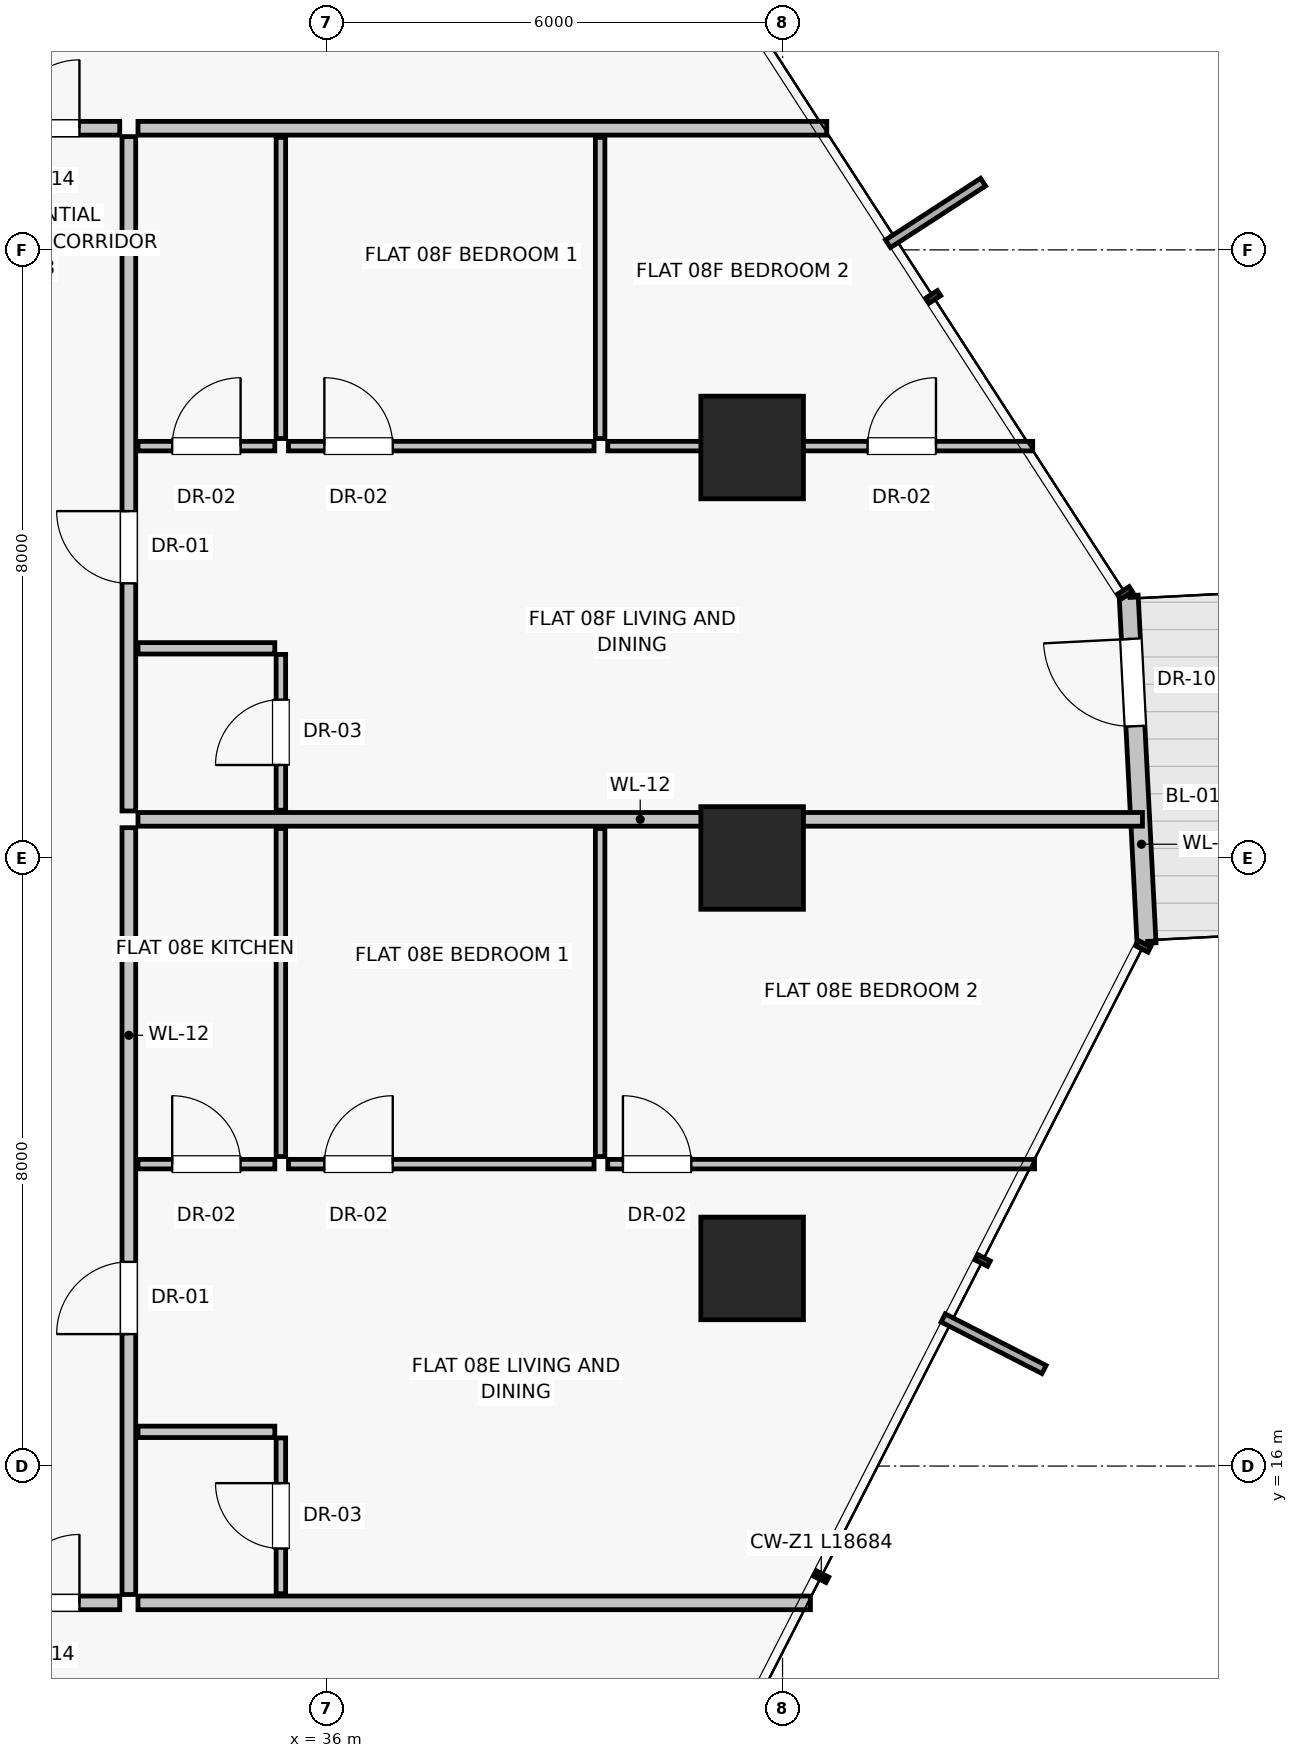
"""IFC4 building model, lengths in metres.
Left out: names, types, materials, properties, quantities, classifications, styles, units other than length and angle.
Written with IfcOpenShell. Run it as: python <this file> out.ifc"""

import sys

from ifc_helpers import new_model, si_unit, direction, frame, frame_2d, origin, origin_2d, place, context, subcontext, project, spatial, rectangle, extrude, source, transform, mapped, element, fill, save


model = new_model("IFC4")
c1 = context("Model", 3, precision=1e-05, world=origin(), true_north=direction((0.0, 1.0)))
c2 = subcontext(c1, "Body", "Model", "MODEL_VIEW")
j1 = project(units=[si_unit("LENGTHUNIT", "METRE"), si_unit("PLANEANGLEUNIT", "RADIAN")], contexts=[c1])
p1 = place(None, origin())
s1 = spatial("IfcSite", under=j1, at=p1, CompositionType="ELEMENT")
p2 = place(p1, origin())
s2 = spatial("IfcBuilding", under=s1, at=p2, CompositionType="ELEMENT")
p3 = place(p2, frame((0.0, 0.0, 33.8)))
s3 = spatial("IfcBuildingStorey", under=s2, at=p3, CompositionType="ELEMENT", Elevation=33.8)
for number, where, z_axis, x_axis in (
    (1, (41.6, 18.6, 0.0), (0.0, 0.0, 1.0), (1.0, 0.0, 0.0)),
    (2, (41.6, 24.0, 0.0), (0.0, 0.0, 1.0), (1.0, 0.0, 0.0)),
    (3, (41.6, 29.4, 0.0), (0.0, 0.0, 1.0), (1.0, 0.0, 0.0)),
):
    element("IfcColumn", number, at=place(p3, frame(where, z_axis=z_axis, x_axis=x_axis)), inside=s3, PredefinedType="COLUMN", context=c2, shape_type="SweptSolid", body=[
        extrude(rectangle(XDim=1.35, YDim=1.35, at=origin_2d()), origin(), (0.0, 0.0, 1.0), 3.25),
    ])
p4 = place(p3, frame((46.789, 22.877, 0.0), z_axis=(0.0, 0.0, 1.0), x_axis=(-0.051280186927, 0.998684305689, 0.0)))
e4 = element("IfcWall", 4, at=p4, inside=s3, PredefinedType="SOLIDWALL", context=c2, shape_type="SweptSolid", body=[
    extrude(rectangle(XDim=4.58, YDim=0.25, at=frame_2d((2.29, 0.0))), origin(), (0.0, 0.0, 1.0), 3.0),
])
p5 = place(p4, frame((2.86, 0.0, 0.0)))
e5 = element("IfcOpeningElement", 5, at=p5, cuts=e4, PredefinedType="OPENING", context=c2, shape_type="SweptSolid", body=[
    extrude(rectangle(XDim=1.15, YDim=2.25, at=frame_2d((0.575, 1.125))), frame((0.0, 0.135, 0.0), z_axis=(0.0, -1.0, 0.0), x_axis=(1.0, 0.0, 0.0)), (0.0, 0.0, 1.0), 0.27),
])
p6 = place(p3, frame((33.52, 14.2, 0.0), z_axis=(0.0, 0.0, 1.0), x_axis=(1.0, 0.0, 0.0)))
e6 = element("IfcWall", 6, at=p6, inside=s3, PredefinedType="PARTITIONING", context=c2, shape_type="SweptSolid", body=[
    extrude(rectangle(XDim=8.847, YDim=0.18, at=frame_2d((4.423, 0.0))), origin(), (0.0, 0.0, 1.0), 3.0),
])
p7 = place(p3, frame((33.52, 33.6, 0.0), z_axis=(0.0, 0.0, 1.0), x_axis=(1.0, 0.0, 0.0)))
e7 = element("IfcWall", 7, at=p7, inside=s3, PredefinedType="PARTITIONING", context=c2, shape_type="SweptSolid", body=[
    extrude(rectangle(XDim=9.062, YDim=0.18, at=frame_2d((4.531, 0.0))), origin(), (0.0, 0.0, 1.0), 3.0),
])
p8 = place(p3, frame((33.4, 14.31, 0.0), z_axis=(0.0, 0.0, 1.0), x_axis=(0.0, 1.0, 0.0)))
e8 = element("IfcWall", 8, at=p8, inside=s3, PredefinedType="PARTITIONING", context=c2, shape_type="SweptSolid", body=[
    extrude(rectangle(XDim=10.088, YDim=0.18, at=frame_2d((5.044, 0.0))), origin(), (0.0, 0.0, 1.0), 3.0),
])
p9 = place(p8, frame((3.426, 0.0, 0.0)))
e9 = element("IfcOpeningElement", 9, at=p9, cuts=e8, PredefinedType="OPENING", context=c2, shape_type="SweptSolid", body=[
    extrude(rectangle(XDim=0.95, YDim=2.02, at=frame_2d((0.475, 1.01))), frame((0.0, 0.1, 0.0), z_axis=(0.0, -1.0, 0.0), x_axis=(1.0, 0.0, 0.0)), (0.0, 0.0, 1.0), 0.2),
])
p10 = place(p3, frame((33.52, 16.45, 0.0), z_axis=(0.0, 0.0, 1.0), x_axis=(1.0, 0.0, 0.0)))
e10 = element("IfcWall", 10, at=p10, inside=s3, PredefinedType="PARTITIONING", context=c2, shape_type="SweptSolid", body=[
    extrude(rectangle(XDim=1.8, YDim=0.15, at=frame_2d((0.9, 0.0))), origin(), (0.0, 0.0, 1.0), 3.0),
])
p11 = place(p3, frame((35.4, 14.32, 0.0), z_axis=(0.0, 0.0, 1.0), x_axis=(0.0, 1.0, 0.0)))
e11 = element("IfcWall", 11, at=p11, inside=s3, PredefinedType="PARTITIONING", context=c2, shape_type="SweptSolid", body=[
    extrude(rectangle(XDim=2.05, YDim=0.125, at=frame_2d((1.025, 0.0))), origin(), (0.0, 0.0, 1.0), 3.0),
])
p12 = place(p11, frame((0.595, 0.0, 0.0)))
e12 = element("IfcOpeningElement", 12, at=p12, cuts=e11, PredefinedType="OPENING", context=c2, shape_type="SweptSolid", body=[
    extrude(rectangle(XDim=0.86, YDim=2.01, at=frame_2d((0.43, 1.005))), frame((0.0, 0.073, 0.0), z_axis=(0.0, -1.0, 0.0), x_axis=(1.0, 0.0, 0.0)), (0.0, 0.0, 1.0), 0.145),
])
p13 = place(p3, frame((33.52, 19.972, 0.0), z_axis=(0.0, 0.0, 1.0), x_axis=(1.0, 0.0, 0.0)))
e13 = element("IfcWall", 13, at=p13, inside=s3, PredefinedType="PARTITIONING", context=c2, shape_type="SweptSolid", body=[
    extrude(rectangle(XDim=1.8, YDim=0.125, at=frame_2d((0.9, 0.0))), origin(), (0.0, 0.0, 1.0), 3.0),
])
p14 = place(p13, frame((0.45, 0.0, 0.0)))
e14 = element("IfcOpeningElement", 14, at=p14, cuts=e13, PredefinedType="OPENING", context=c2, shape_type="SweptSolid", body=[
    extrude(rectangle(XDim=0.9, YDim=2.01, at=frame_2d((0.45, 1.005))), frame((0.0, 0.073, 0.0), z_axis=(0.0, -1.0, 0.0), x_axis=(1.0, 0.0, 0.0)), (0.0, 0.0, 1.0), 0.145),
])
for number, where, z_axis, x_axis in (
    (15, (35.4, 20.072, 0.0), (0.0, 0.0, 1.0), (0.0, 1.0, 0.0)),
    (16, (39.6, 20.072, 0.0), (0.0, 0.0, 1.0), (0.0, 1.0, 0.0)),
):
    element("IfcWall", number, at=place(p3, frame(where, z_axis=z_axis, x_axis=x_axis)), inside=s3, PredefinedType="PARTITIONING", context=c2, shape_type="SweptSolid", body=[
        extrude(rectangle(XDim=4.316, YDim=0.125, at=frame_2d((2.158, 0.0))), origin(), (0.0, 0.0, 1.0), 3.0),
    ])
p15 = place(p3, frame((35.5, 19.972, 0.0), z_axis=(0.0, 0.0, 1.0), x_axis=(1.0, 0.0, 0.0)))
e17 = element("IfcWall", 17, at=p15, inside=s3, PredefinedType="PARTITIONING", context=c2, shape_type="SweptSolid", body=[
    extrude(rectangle(XDim=4.02, YDim=0.125, at=frame_2d((2.01, 0.0))), origin(), (0.0, 0.0, 1.0), 3.0),
])
p16 = place(p15, frame((0.472, 0.0, 0.0)))
e18 = element("IfcOpeningElement", 18, at=p16, cuts=e17, PredefinedType="OPENING", context=c2, shape_type="SweptSolid", body=[
    extrude(rectangle(XDim=0.9, YDim=2.01, at=frame_2d((0.45, 1.005))), frame((0.0, 0.073, 0.0), z_axis=(0.0, -1.0, 0.0), x_axis=(1.0, 0.0, 0.0)), (0.0, 0.0, 1.0), 0.145),
])
p17 = place(p3, frame((39.7, 19.972, 0.0), z_axis=(0.0, 0.0, 1.0), x_axis=(1.0, 0.0, 0.0)))
e19 = element("IfcWall", 19, at=p17, inside=s3, PredefinedType="PARTITIONING", context=c2, shape_type="SweptSolid", body=[
    extrude(rectangle(XDim=5.616, YDim=0.125, at=frame_2d((2.808, 0.0))), origin(), (0.0, 0.0, 1.0), 3.0),
])
p18 = place(p17, frame((0.2, 0.0, 0.0)))
e20 = element("IfcOpeningElement", 20, at=p18, cuts=e19, PredefinedType="OPENING", context=c2, shape_type="SweptSolid", body=[
    extrude(rectangle(XDim=0.9, YDim=2.01, at=frame_2d((0.45, 1.005))), frame((0.0, 0.073, 0.0), z_axis=(0.0, -1.0, 0.0), x_axis=(1.0, 0.0, 0.0)), (0.0, 0.0, 1.0), 0.145),
])
p19 = place(p3, frame((33.52, 24.508, 0.0), z_axis=(0.0, 0.0, 1.0), x_axis=(1.0, 0.0, 0.0)))
e21 = element("IfcWall", 21, at=p19, inside=s3, PredefinedType="PARTITIONING", context=c2, shape_type="SweptSolid", body=[
    extrude(rectangle(XDim=13.215, YDim=0.18, at=frame_2d((6.607, 0.0))), origin(), (0.0, 0.0, 1.0), 3.0),
])
p20 = place(p3, frame((33.4, 24.618, 0.0), z_axis=(0.0, 0.0, 1.0), x_axis=(0.0, 1.0, 0.0)))
e22 = element("IfcWall", 22, at=p20, inside=s3, PredefinedType="PARTITIONING", context=c2, shape_type="SweptSolid", body=[
    extrude(rectangle(XDim=8.872, YDim=0.18, at=frame_2d((4.436, 0.0))), origin(), (0.0, 0.0, 1.0), 3.0),
])
p21 = place(p20, frame((2.995, 0.0, 0.0)))
e23 = element("IfcOpeningElement", 23, at=p21, cuts=e22, PredefinedType="OPENING", context=c2, shape_type="SweptSolid", body=[
    extrude(rectangle(XDim=0.95, YDim=2.02, at=frame_2d((0.475, 1.01))), frame((0.0, 0.1, 0.0), z_axis=(0.0, -1.0, 0.0), x_axis=(1.0, 0.0, 0.0)), (0.0, 0.0, 1.0), 0.2),
])
p22 = place(p3, frame((33.52, 26.758, 0.0), z_axis=(0.0, 0.0, 1.0), x_axis=(1.0, 0.0, 0.0)))
e24 = element("IfcWall", 24, at=p22, inside=s3, PredefinedType="PARTITIONING", context=c2, shape_type="SweptSolid", body=[
    extrude(rectangle(XDim=1.8, YDim=0.15, at=frame_2d((0.9, 0.0))), origin(), (0.0, 0.0, 1.0), 3.0),
])
p23 = place(p3, frame((35.4, 24.628, 0.0), z_axis=(0.0, 0.0, 1.0), x_axis=(0.0, 1.0, 0.0)))
e25 = element("IfcWall", 25, at=p23, inside=s3, PredefinedType="PARTITIONING", context=c2, shape_type="SweptSolid", body=[
    extrude(rectangle(XDim=2.05, YDim=0.125, at=frame_2d((1.025, 0.0))), origin(), (0.0, 0.0, 1.0), 3.0),
])
p24 = place(p23, frame((0.595, 0.0, 0.0)))
e26 = element("IfcOpeningElement", 26, at=p24, cuts=e25, PredefinedType="OPENING", context=c2, shape_type="SweptSolid", body=[
    extrude(rectangle(XDim=0.86, YDim=2.01, at=frame_2d((0.43, 1.005))), frame((0.0, 0.073, 0.0), z_axis=(0.0, -1.0, 0.0), x_axis=(1.0, 0.0, 0.0)), (0.0, 0.0, 1.0), 0.145),
])
p25 = place(p3, frame((33.52, 29.418, 0.0), z_axis=(0.0, 0.0, 1.0), x_axis=(1.0, 0.0, 0.0)))
e27 = element("IfcWall", 27, at=p25, inside=s3, PredefinedType="PARTITIONING", context=c2, shape_type="SweptSolid", body=[
    extrude(rectangle(XDim=1.8, YDim=0.125, at=frame_2d((0.9, 0.0))), origin(), (0.0, 0.0, 1.0), 3.0),
])
p26 = place(p25, frame((0.45, 0.0, 0.0)))
e28 = element("IfcOpeningElement", 28, at=p26, cuts=e27, PredefinedType="OPENING", context=c2, shape_type="SweptSolid", body=[
    extrude(rectangle(XDim=0.9, YDim=2.01, at=frame_2d((0.45, 1.005))), frame((0.0, 0.073, 0.0), z_axis=(0.0, -1.0, 0.0), x_axis=(1.0, 0.0, 0.0)), (0.0, 0.0, 1.0), 0.145),
])
for number, where, z_axis, x_axis in (
    (29, (35.4, 29.518, 0.0), (0.0, 0.0, 1.0), (0.0, 1.0, 0.0)),
    (30, (39.6, 29.518, 0.0), (0.0, 0.0, 1.0), (0.0, 1.0, 0.0)),
):
    element("IfcWall", number, at=place(p3, frame(where, z_axis=z_axis, x_axis=x_axis)), inside=s3, PredefinedType="PARTITIONING", context=c2, shape_type="SweptSolid", body=[
        extrude(rectangle(XDim=3.962, YDim=0.125, at=frame_2d((1.981, 0.0))), origin(), (0.0, 0.0, 1.0), 3.0),
    ])
p27 = place(p3, frame((35.5, 29.418, 0.0), z_axis=(0.0, 0.0, 1.0), x_axis=(1.0, 0.0, 0.0)))
e31 = element("IfcWall", 31, at=p27, inside=s3, PredefinedType="PARTITIONING", context=c2, shape_type="SweptSolid", body=[
    extrude(rectangle(XDim=4.02, YDim=0.125, at=frame_2d((2.01, 0.0))), origin(), (0.0, 0.0, 1.0), 2.299),
])
p28 = place(p27, frame((0.472, 0.0, 0.0)))
e32 = element("IfcOpeningElement", 32, at=p28, cuts=e31, PredefinedType="OPENING", context=c2, shape_type="SweptSolid", body=[
    extrude(rectangle(XDim=0.9, YDim=2.01, at=frame_2d((0.45, 1.005))), frame((0.0, 0.073, 0.0), z_axis=(0.0, -1.0, 0.0), x_axis=(1.0, 0.0, 0.0)), (0.0, 0.0, 1.0), 0.145),
])
p29 = place(p3, frame((39.7, 29.418, 0.0), z_axis=(0.0, 0.0, 1.0), x_axis=(1.0, 0.0, 0.0)))
e33 = element("IfcWall", 33, at=p29, inside=s3, PredefinedType="PARTITIONING", context=c2, shape_type="SweptSolid", body=[
    extrude(rectangle(XDim=5.591, YDim=0.125, at=frame_2d((2.796, 0.0))), origin(), (0.0, 0.0, 1.0), 2.299),
])
p30 = place(p29, frame((3.418, 0.0, 0.0)))
e34 = element("IfcOpeningElement", 34, at=p30, cuts=e33, PredefinedType="OPENING", context=c2, shape_type="SweptSolid", body=[
    extrude(rectangle(XDim=0.9, YDim=2.01, at=frame_2d((0.45, 1.005))), frame((0.0, 0.073, 0.0), z_axis=(0.0, -1.0, 0.0), x_axis=(1.0, 0.0, 0.0)), (0.0, 0.0, 1.0), 0.145),
])
p31 = place(p3, frame((31.32, 14.2, 0.0), z_axis=(0.0, 0.0, 1.0), x_axis=(1.0, 0.0, 0.0)))
e35 = element("IfcWall", 35, at=p31, inside=s3, PredefinedType="PARTITIONING", context=c2, shape_type="SweptSolid", body=[
    extrude(rectangle(XDim=1.96, YDim=0.18, at=frame_2d((0.98, 0.0))), origin(), (0.0, 0.0, 1.0), 3.0),
])
p32 = place(p31, frame((0.53, 0.0, 0.0)))
e36 = element("IfcOpeningElement", 36, at=p32, cuts=e35, PredefinedType="OPENING", context=c2, shape_type="SweptSolid", body=[
    extrude(rectangle(XDim=0.9, YDim=2.01, at=frame_2d((0.45, 1.005))), frame((0.0, 0.1, 0.0), z_axis=(0.0, -1.0, 0.0), x_axis=(1.0, 0.0, 0.0)), (0.0, 0.0, 1.0), 0.2),
])
p33 = place(p3, frame((31.32, 33.6, 0.0), z_axis=(0.0, 0.0, 1.0), x_axis=(1.0, 0.0, 0.0)))
e37 = element("IfcWall", 37, at=p33, inside=s3, PredefinedType="PARTITIONING", context=c2, shape_type="SweptSolid", body=[
    extrude(rectangle(XDim=1.96, YDim=0.18, at=frame_2d((0.98, 0.0))), origin(), (0.0, 0.0, 1.0), 3.0),
])
p34 = place(p33, frame((0.53, 0.0, 0.0)))
e38 = element("IfcOpeningElement", 38, at=p34, cuts=e37, PredefinedType="OPENING", context=c2, shape_type="SweptSolid", body=[
    extrude(rectangle(XDim=0.9, YDim=2.01, at=frame_2d((0.45, 1.005))), frame((0.0, 0.1, 0.0), z_axis=(0.0, -1.0, 0.0), x_axis=(1.0, 0.0, 0.0)), (0.0, 0.0, 1.0), 0.2),
])
m1 = source(origin(), c2, "Body", "SweptSolid", [
    extrude(rectangle(XDim=1.15, YDim=2.25, at=frame_2d((0.575, 1.125))), frame((0.0, 0.025, 0.0), z_axis=(0.0, -1.0, 0.0), x_axis=(1.0, 0.0, 0.0)), (0.0, 0.0, 1.0), 0.05),
])
p35 = place(p5, frame((1.15, 0.0, 0.0), z_axis=(0.0, 0.0, 1.0), x_axis=(-1.0, 0.0, 0.0)))
e39 = element("IfcDoor", 39, at=p35, inside=s3, OperationType="SINGLE_SWING_RIGHT", PredefinedType="DOOR", context=c2, shape_type="MappedRepresentation", body=[
    mapped(m1, transform((0.0, 0.0, 0.0), scale=1.0)),
])
fill(e5, e39)
m2 = source(origin(), c2, "Body", "SweptSolid", [
    extrude(rectangle(XDim=0.95, YDim=2.02, at=frame_2d((0.475, 1.01))), frame((0.0, 0.025, 0.0), z_axis=(0.0, -1.0, 0.0), x_axis=(1.0, 0.0, 0.0)), (0.0, 0.0, 1.0), 0.05),
])
p36 = place(p9, origin())
e40 = element("IfcDoor", 40, at=p36, inside=s3, OperationType="SINGLE_SWING_LEFT", PredefinedType="DOOR", context=c2, shape_type="MappedRepresentation", body=[
    mapped(m2, transform((0.0, 0.0, 0.0), scale=1.0)),
])
fill(e9, e40)
m3 = source(origin(), c2, "Body", "SweptSolid", [
    extrude(rectangle(XDim=0.86, YDim=2.01, at=frame_2d((0.43, 1.005))), frame((0.0, 0.025, 0.0), z_axis=(0.0, -1.0, 0.0), x_axis=(1.0, 0.0, 0.0)), (0.0, 0.0, 1.0), 0.05),
])
p37 = place(p12, origin())
e41 = element("IfcDoor", 41, at=p37, inside=s3, OperationType="SINGLE_SWING_RIGHT", PredefinedType="DOOR", context=c2, shape_type="MappedRepresentation", body=[
    mapped(m3, transform((0.0, 0.0, 0.0), scale=1.0)),
])
fill(e12, e41)
m4 = source(origin(), c2, "Body", "SweptSolid", [
    extrude(rectangle(XDim=0.9, YDim=2.01, at=frame_2d((0.45, 1.005))), frame((0.0, 0.025, 0.0), z_axis=(0.0, -1.0, 0.0), x_axis=(1.0, 0.0, 0.0)), (0.0, 0.0, 1.0), 0.05),
])
p38 = place(p14, origin())
e42 = element("IfcDoor", 42, at=p38, inside=s3, OperationType="SINGLE_SWING_LEFT", PredefinedType="DOOR", context=c2, shape_type="MappedRepresentation", body=[
    mapped(m4, transform((0.0, 0.0, 0.0), scale=1.0)),
])
fill(e14, e42)
p39 = place(p16, origin())
e43 = element("IfcDoor", 43, at=p39, inside=s3, OperationType="SINGLE_SWING_RIGHT", PredefinedType="DOOR", context=c2, shape_type="MappedRepresentation", body=[
    mapped(m4, transform((0.0, 0.0, 0.0), scale=1.0)),
])
fill(e18, e43)
p40 = place(p18, origin())
e44 = element("IfcDoor", 44, at=p40, inside=s3, OperationType="SINGLE_SWING_LEFT", PredefinedType="DOOR", context=c2, shape_type="MappedRepresentation", body=[
    mapped(m4, transform((0.0, 0.0, 0.0), scale=1.0)),
])
fill(e20, e44)
p41 = place(p21, origin())
e45 = element("IfcDoor", 45, at=p41, inside=s3, OperationType="SINGLE_SWING_RIGHT", PredefinedType="DOOR", context=c2, shape_type="MappedRepresentation", body=[
    mapped(m2, transform((0.0, 0.0, 0.0), scale=1.0)),
])
fill(e23, e45)
p42 = place(p24, origin())
e46 = element("IfcDoor", 46, at=p42, inside=s3, OperationType="SINGLE_SWING_LEFT", PredefinedType="DOOR", context=c2, shape_type="MappedRepresentation", body=[
    mapped(m3, transform((0.0, 0.0, 0.0), scale=1.0)),
])
fill(e26, e46)
p43 = place(p26, origin())
e47 = element("IfcDoor", 47, at=p43, inside=s3, OperationType="SINGLE_SWING_RIGHT", PredefinedType="DOOR", context=c2, shape_type="MappedRepresentation", body=[
    mapped(m4, transform((0.0, 0.0, 0.0), scale=1.0)),
])
fill(e28, e47)
p44 = place(p28, origin())
e48 = element("IfcDoor", 48, at=p44, inside=s3, OperationType="SINGLE_SWING_LEFT", PredefinedType="DOOR", context=c2, shape_type="MappedRepresentation", body=[
    mapped(m4, transform((0.0, 0.0, 0.0), scale=1.0)),
])
fill(e32, e48)
p45 = place(p30, origin())
e49 = element("IfcDoor", 49, at=p45, inside=s3, OperationType="SINGLE_SWING_RIGHT", PredefinedType="DOOR", context=c2, shape_type="MappedRepresentation", body=[
    mapped(m4, transform((0.0, 0.0, 0.0), scale=1.0)),
])
fill(e34, e49)
p46 = place(p32, origin())
e50 = element("IfcDoor", 50, at=p46, inside=s3, OperationType="SINGLE_SWING_RIGHT", PredefinedType="DOOR", context=c2, shape_type="MappedRepresentation", body=[
    mapped(m4, transform((0.0, 0.0, 0.0), scale=1.0)),
])
fill(e36, e50)
p47 = place(p34, origin())
e51 = element("IfcDoor", 51, at=p47, inside=s3, OperationType="SINGLE_SWING_RIGHT", PredefinedType="DOOR", context=c2, shape_type="MappedRepresentation", body=[
    mapped(m4, transform((0.0, 0.0, 0.0), scale=1.0)),
])
fill(e38, e51)
save(model, sys.argv[1])
